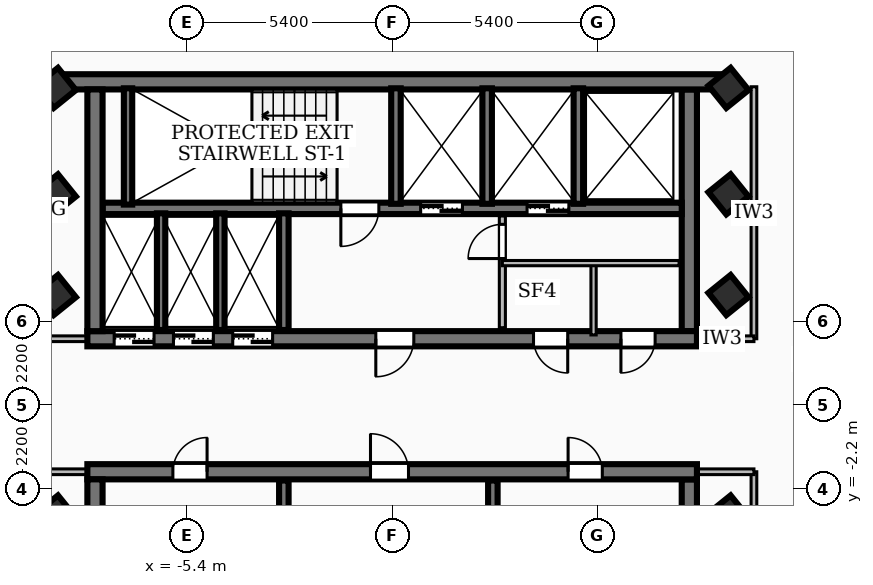
"""IFC4 building model, lengths in metres.
Left out: names, types, materials, properties, quantities, classifications, styles, units other than length and angle.
Written with IfcOpenShell. Run it as: python <this file> out.ifc"""

import sys

from ifc_helpers import new_model, si_unit, direction, frame, frame_2d, origin, origin_2d, place, context, subcontext, project, spatial, rectangle, extrude, element, fill, save


model = new_model("IFC4")
c1 = context("Model", 3, precision=1e-05, world=origin(), true_north=direction((0.0, 1.0)))
c2 = subcontext(c1, "Body", "Model", "MODEL_VIEW")
j1 = project(units=[si_unit("LENGTHUNIT", "METRE"), si_unit("PLANEANGLEUNIT", "RADIAN")], contexts=[c1])
p1 = place(None, origin())
s1 = spatial("IfcSite", under=j1, at=p1, CompositionType="ELEMENT")
p2 = place(p1, origin())
s2 = spatial("IfcBuilding", under=s1, at=p2, CompositionType="ELEMENT")
p3 = place(p2, frame((0.0, 0.0, 235.98)))
s3 = spatial("IfcBuildingStorey", under=s2, at=p3, CompositionType="ELEMENT", Elevation=235.98)
p4 = place(p3, frame((-8.78, 8.51, 0.0), z_axis=(0.0, 0.0, 1.0), x_axis=(1.0, 0.0, 0.0)))
e1 = element("IfcWall", 1, at=p4, inside=s3, PredefinedType="SHEAR", context=c2, shape_type="SweptSolid", body=[
    extrude(rectangle(XDim=17.56, YDim=0.4, at=frame_2d((8.78, 0.0))), origin(), (0.0, 0.0, 1.0), 3.02),
])
p5 = place(p3, frame((8.02, 1.75, 0.0), z_axis=(0.0, 0.0, 1.0), x_axis=(-1.0, 0.0, 0.0)))
e2 = element("IfcWall", 2, at=p5, inside=s3, PredefinedType="SHEAR", context=c2, shape_type="SweptSolid", body=[
    extrude(rectangle(XDim=16.04, YDim=0.4, at=frame_2d((8.02, 0.0))), origin(), (0.0, 0.0, 1.0), 3.02),
])
p6 = place(p5, frame((7.45, 0.0, 0.0)))
e3 = element("IfcOpeningElement", 3, at=p6, cuts=e2, PredefinedType="OPENING", context=c2, shape_type="SweptSolid", body=[
    extrude(rectangle(XDim=1.0, YDim=2.1, at=frame_2d((0.5, 1.05))), frame((0.0, 0.21, 0.0), z_axis=(0.0, -1.0, 0.0), x_axis=(1.0, 0.0, 0.0)), (0.0, 0.0, 1.0), 0.42),
])
p7 = place(p5, frame((14.285, 0.0, 0.0)))
e4 = element("IfcOpeningElement", 4, at=p7, cuts=e2, PredefinedType="OPENING", context=c2, shape_type="SweptSolid", body=[
    extrude(rectangle(XDim=1.05, YDim=2.15, at=frame_2d((0.525, 1.075))), frame((0.0, 0.21, 0.0), z_axis=(0.0, -1.0, 0.0), x_axis=(1.0, 0.0, 0.0)), (0.0, 0.0, 1.0), 0.42),
])
p8 = place(p5, frame((12.725, 0.0, 0.0)))
e5 = element("IfcOpeningElement", 5, at=p8, cuts=e2, PredefinedType="OPENING", context=c2, shape_type="SweptSolid", body=[
    extrude(rectangle(XDim=1.05, YDim=2.15, at=frame_2d((0.525, 1.075))), frame((0.0, 0.21, 0.0), z_axis=(0.0, -1.0, 0.0), x_axis=(1.0, 0.0, 0.0)), (0.0, 0.0, 1.0), 0.42),
])
p9 = place(p5, frame((11.165, 0.0, 0.0)))
e6 = element("IfcOpeningElement", 6, at=p9, cuts=e2, PredefinedType="OPENING", context=c2, shape_type="SweptSolid", body=[
    extrude(rectangle(XDim=1.05, YDim=2.15, at=frame_2d((0.525, 1.075))), frame((0.0, 0.21, 0.0), z_axis=(0.0, -1.0, 0.0), x_axis=(1.0, 0.0, 0.0)), (0.0, 0.0, 1.0), 0.42),
])
p10 = place(p5, frame((3.4, 0.0, 0.0)))
e7 = element("IfcOpeningElement", 7, at=p10, cuts=e2, PredefinedType="OPENING", context=c2, shape_type="SweptSolid", body=[
    extrude(rectangle(XDim=0.9, YDim=2.06, at=frame_2d((0.45, 1.03))), frame((0.0, 0.21, 0.0), z_axis=(0.0, -1.0, 0.0), x_axis=(1.0, 0.0, 0.0)), (0.0, 0.0, 1.0), 0.42),
])
p11 = place(p5, frame((1.1, 0.0, 0.0)))
e8 = element("IfcOpeningElement", 8, at=p11, cuts=e2, PredefinedType="OPENING", context=c2, shape_type="SweptSolid", body=[
    extrude(rectangle(XDim=0.9, YDim=2.06, at=frame_2d((0.45, 1.03))), frame((0.0, 0.21, 0.0), z_axis=(0.0, -1.0, 0.0), x_axis=(1.0, 0.0, 0.0)), (0.0, 0.0, 1.0), 0.42),
])
for number, where, z_axis, x_axis in (
    (9, (-7.82, 1.95, 0.0), (0.0, 0.0, 1.0), (0.0, 1.0, 0.0)),
    (10, (7.82, 8.31, 0.0), (0.0, 0.0, 1.0), (0.0, -1.0, 0.0)),
):
    element("IfcWall", number, at=place(p3, frame(where, z_axis=z_axis, x_axis=x_axis)), inside=s3, PredefinedType="SHEAR", context=c2, shape_type="SweptSolid", body=[
        extrude(rectangle(XDim=6.36, YDim=0.4, at=frame_2d((3.18, 0.0))), origin(), (0.0, 0.0, 1.0), 3.02),
    ])
p12 = place(p3, frame((7.62, 5.18, 0.0), z_axis=(0.0, 0.0, 1.0), x_axis=(-1.0, 0.0, 0.0)))
e11 = element("IfcWall", 11, at=p12, inside=s3, PredefinedType="SOLIDWALL", context=c2, shape_type="SweptSolid", body=[
    extrude(rectangle(XDim=15.24, YDim=0.3, at=frame_2d((7.62, 0.0))), origin(), (0.0, 0.0, 1.0), 3.02),
])
p13 = place(p12, frame((5.77, 0.0, 0.0)))
e12 = element("IfcOpeningElement", 12, at=p13, cuts=e11, PredefinedType="OPENING", context=c2, shape_type="SweptSolid", body=[
    extrude(rectangle(XDim=1.1, YDim=2.15, at=frame_2d((0.55, 1.075))), frame((0.0, 0.16, 0.0), z_axis=(0.0, -1.0, 0.0), x_axis=(1.0, 0.0, 0.0)), (0.0, 0.0, 1.0), 0.32),
])
p14 = place(p12, frame((2.97, 0.0, 0.0)))
e13 = element("IfcOpeningElement", 13, at=p14, cuts=e11, PredefinedType="OPENING", context=c2, shape_type="SweptSolid", body=[
    extrude(rectangle(XDim=1.1, YDim=2.15, at=frame_2d((0.55, 1.075))), frame((0.0, 0.16, 0.0), z_axis=(0.0, -1.0, 0.0), x_axis=(1.0, 0.0, 0.0)), (0.0, 0.0, 1.0), 0.32),
])
p15 = place(p12, frame((7.97, 0.0, 0.0)))
e14 = element("IfcOpeningElement", 14, at=p15, cuts=e11, PredefinedType="OPENING", context=c2, shape_type="SweptSolid", body=[
    extrude(rectangle(XDim=1.0, YDim=2.1, at=frame_2d((0.5, 1.05))), frame((0.0, 0.16, 0.0), z_axis=(0.0, -1.0, 0.0), x_axis=(1.0, 0.0, 0.0)), (0.0, 0.0, 1.0), 0.32),
])
p16 = place(p3, frame((-8.02, -1.75, 0.0), z_axis=(0.0, 0.0, 1.0), x_axis=(1.0, 0.0, 0.0)))
e15 = element("IfcWall", 15, at=p16, inside=s3, PredefinedType="SHEAR", context=c2, shape_type="SweptSolid", body=[
    extrude(rectangle(XDim=16.04, YDim=0.4, at=frame_2d((8.02, 0.0))), origin(), (0.0, 0.0, 1.0), 3.02),
])
p17 = place(p16, frame((7.45, 0.0, 0.0)))
e16 = element("IfcOpeningElement", 16, at=p17, cuts=e15, PredefinedType="OPENING", context=c2, shape_type="SweptSolid", body=[
    extrude(rectangle(XDim=1.0, YDim=2.1, at=frame_2d((0.5, 1.05))), frame((0.0, 0.21, 0.0), z_axis=(0.0, -1.0, 0.0), x_axis=(1.0, 0.0, 0.0)), (0.0, 0.0, 1.0), 0.42),
])
p18 = place(p16, frame((12.65, 0.0, 0.0)))
e17 = element("IfcOpeningElement", 17, at=p18, cuts=e15, PredefinedType="OPENING", context=c2, shape_type="SweptSolid", body=[
    extrude(rectangle(XDim=0.9, YDim=2.06, at=frame_2d((0.45, 1.03))), frame((0.0, 0.21, 0.0), z_axis=(0.0, -1.0, 0.0), x_axis=(1.0, 0.0, 0.0)), (0.0, 0.0, 1.0), 0.42),
])
p19 = place(p16, frame((2.25, 0.0, 0.0)))
e18 = element("IfcOpeningElement", 18, at=p19, cuts=e15, PredefinedType="OPENING", context=c2, shape_type="SweptSolid", body=[
    extrude(rectangle(XDim=0.9, YDim=2.06, at=frame_2d((0.45, 1.03))), frame((0.0, 0.21, 0.0), z_axis=(0.0, -1.0, 0.0), x_axis=(1.0, 0.0, 0.0)), (0.0, 0.0, 1.0), 0.42),
])
for number, where, z_axis, x_axis in (
    (19, (-7.82, -8.31, 0.0), (0.0, 0.0, 1.0), (0.0, 1.0, 0.0)),
    (20, (7.82, -1.95, 0.0), (0.0, 0.0, 1.0), (0.0, -1.0, 0.0)),
):
    element("IfcWall", number, at=place(p3, frame(where, z_axis=z_axis, x_axis=x_axis)), inside=s3, PredefinedType="SHEAR", context=c2, shape_type="SweptSolid", body=[
        extrude(rectangle(XDim=6.36, YDim=0.4, at=frame_2d((3.18, 0.0))), origin(), (0.0, 0.0, 1.0), 3.02),
    ])
p20 = place(p3, frame((-6.95, 5.28, 0.0), z_axis=(0.0, 0.0, 1.0), x_axis=(0.0, 1.0, 0.0)))
e21 = element("IfcWall", 21, at=p20, inside=s3, PredefinedType="SOLIDWALL", context=c2, shape_type="SweptSolid", body=[
    extrude(rectangle(XDim=3.06, YDim=0.22, at=frame_2d((1.53, 0.0))), origin(), (0.0, 0.0, 1.0), 3.02),
])
for number, where, z_axis, x_axis in (
    (22, (0.1, 5.3, 0.0), (0.0, 0.0, 1.0), (0.0, 1.0, 0.0)),
    (23, (2.5, 5.3, 0.0), (0.0, 0.0, 1.0), (0.0, 1.0, 0.0)),
    (24, (4.9, 5.3, 0.0), (0.0, 0.0, 1.0), (0.0, 1.0, 0.0)),
):
    element("IfcWall", number, at=place(p3, frame(where, z_axis=z_axis, x_axis=x_axis)), inside=s3, PredefinedType="SOLIDWALL", context=c2, shape_type="SweptSolid", body=[
        extrude(rectangle(XDim=3.04, YDim=0.25, at=frame_2d((1.52, 0.0))), origin(), (0.0, 0.0, 1.0), 3.02),
    ])
for number, where, z_axis, x_axis in (
    (25, (-2.85, 1.98, 0.0), (0.0, 0.0, 1.0), (0.0, 1.0, 0.0)),
    (26, (-2.85, -5.05, 0.0), (0.0, 0.0, 1.0), (0.0, 1.0, 0.0)),
    (27, (2.65, -5.05, 0.0), (0.0, 0.0, 1.0), (0.0, 1.0, 0.0)),
):
    element("IfcWall", number, at=place(p3, frame(where, z_axis=z_axis, x_axis=x_axis)), inside=s3, PredefinedType="SOLIDWALL", context=c2, shape_type="SweptSolid", body=[
        extrude(rectangle(XDim=3.07, YDim=0.25, at=frame_2d((1.535, 0.0))), origin(), (0.0, 0.0, 1.0), 3.02),
    ])
for number, where, z_axis, x_axis in (
    (28, (-6.08, 1.98, 0.0), (0.0, 0.0, 1.0), (0.0, 1.0, 0.0)),
    (29, (-4.52, 1.98, 0.0), (0.0, 0.0, 1.0), (0.0, 1.0, 0.0)),
):
    element("IfcWall", number, at=place(p3, frame(where, z_axis=z_axis, x_axis=x_axis)), inside=s3, PredefinedType="SOLIDWALL", context=c2, shape_type="SweptSolid", body=[
        extrude(rectangle(XDim=3.07, YDim=0.22, at=frame_2d((1.535, 0.0))), origin(), (0.0, 0.0, 1.0), 3.02),
    ])
for number, where, z_axis, x_axis in (
    (30, (-8.85, -2.9, 0.0), (0.0, 0.0, 1.0), (0.778, 0.628, 0.0)),
    (31, (-8.85, 2.9, 0.0), (0.0, 0.0, 1.0), (0.778, 0.628, 0.0)),
    (32, (-8.85, 5.55, 0.0), (0.0, 0.0, 1.0), (0.778, 0.628, 0.0)),
    (33, (8.85, -2.9, 0.0), (0.0, 0.0, 1.0), (0.778, 0.628, 0.0)),
    (34, (8.85, 2.9, 0.0), (0.0, 0.0, 1.0), (0.778, 0.628, 0.0)),
    (35, (8.85, 5.55, 0.0), (0.0, 0.0, 1.0), (0.778, 0.628, 0.0)),
    (36, (-8.85, 8.35, 0.0), (0.0, 0.0, 1.0), (0.778, 0.628, 0.0)),
    (37, (8.85, 8.35, 0.0), (0.0, 0.0, 1.0), (0.778, 0.628, 0.0)),
):
    element("IfcColumn", number, at=place(p3, frame(where, z_axis=z_axis, x_axis=x_axis)), inside=s3, PredefinedType="COLUMN", context=c2, shape_type="SweptSolid", body=[
        extrude(rectangle(XDim=0.75, YDim=0.75, at=origin_2d()), origin(), (0.0, 0.0, 1.0), 3.42),
    ])
p21 = place(p3, frame((2.9, 2.04, 0.0), z_axis=(0.0, 0.0, 1.0), x_axis=(0.0, 1.0, 0.0)))
e38 = element("IfcWall", 38, at=p21, inside=s3, PredefinedType="PARTITIONING", context=c2, shape_type="SweptSolid", body=[
    extrude(rectangle(XDim=2.94, YDim=0.16, at=frame_2d((1.47, 0.0))), origin(), (0.0, 0.0, 1.0), 2.25),
])
p22 = place(p21, frame((1.82, 0.0, 0.0)))
e39 = element("IfcOpeningElement", 39, at=p22, cuts=e38, PredefinedType="OPENING", context=c2, shape_type="SweptSolid", body=[
    extrude(rectangle(XDim=0.9, YDim=2.06, at=frame_2d((0.45, 1.03))), frame((0.0, 0.09, 0.0), z_axis=(0.0, -1.0, 0.0), x_axis=(1.0, 0.0, 0.0)), (0.0, 0.0, 1.0), 0.18),
])
p23 = place(p3, frame((2.9, 3.74, 0.0), z_axis=(0.0, 0.0, 1.0), x_axis=(1.0, 0.0, 0.0)))
e40 = element("IfcWall", 40, at=p23, inside=s3, PredefinedType="PARTITIONING", context=c2, shape_type="SweptSolid", body=[
    extrude(rectangle(XDim=4.65, YDim=0.138, at=frame_2d((2.325, 0.0))), origin(), (0.0, 0.0, 1.0), 3.02),
])
p24 = place(p3, frame((5.3, 1.85, 0.0), z_axis=(0.0, 0.0, 1.0), x_axis=(0.0, 1.0, 0.0)))
e41 = element("IfcWall", 41, at=p24, inside=s3, PredefinedType="PARTITIONING", context=c2, shape_type="SweptSolid", body=[
    extrude(rectangle(XDim=1.89, YDim=0.138, at=frame_2d((0.945, 0.0))), origin(), (0.0, 0.0, 1.0), 2.25),
])
for number, where, z_axis, x_axis in (
    (42, (-7.85, 1.75, 0.0), (0.0, 0.0, 1.0), (-1.0, 0.0, 0.0)),
    (43, (-7.85, -1.75, 0.0), (0.0, 0.0, 1.0), (-1.0, 0.0, 0.0)),
):
    element("IfcWall", number, at=place(p3, frame(where, z_axis=z_axis, x_axis=x_axis)), inside=s3, PredefinedType="PARTITIONING", context=c2, shape_type="SweptSolid", body=[
        extrude(rectangle(XDim=1.67, YDim=0.15, at=frame_2d((0.835, 0.0))), origin(), (0.0, 0.0, 1.0), 1.15),
    ])
p25 = place(p3, frame((9.52, 1.75, 0.0), z_axis=(0.0, 0.0, 1.0), x_axis=(0.0, 1.0, 0.0)))
e44 = element("IfcWall", 44, at=p25, inside=s3, PredefinedType="PARTITIONING", context=c2, shape_type="SweptSolid", body=[
    extrude(rectangle(XDim=6.63, YDim=0.15, at=frame_2d((3.315, 0.0))), origin(), (0.0, 0.0, 1.0), 2.39),
])
p26 = place(p3, frame((7.85, 1.75, 0.0), z_axis=(0.0, 0.0, 1.0), x_axis=(1.0, 0.0, 0.0)))
e45 = element("IfcWall", 45, at=p26, inside=s3, PredefinedType="PARTITIONING", context=c2, shape_type="SweptSolid", body=[
    extrude(rectangle(XDim=1.67, YDim=0.15, at=frame_2d((0.835, 0.0))), origin(), (0.0, 0.0, 1.0), 2.25),
])
p27 = place(p3, frame((9.52, -8.38, 0.0), z_axis=(0.0, 0.0, 1.0), x_axis=(0.0, 1.0, 0.0)))
e46 = element("IfcWall", 46, at=p27, inside=s3, PredefinedType="PARTITIONING", context=c2, shape_type="SweptSolid", body=[
    extrude(rectangle(XDim=6.63, YDim=0.15, at=frame_2d((3.315, 0.0))), origin(), (0.0, 0.0, 1.0), 3.02),
])
p28 = place(p3, frame((7.85, -1.75, 0.0), z_axis=(0.0, 0.0, 1.0), x_axis=(1.0, 0.0, 0.0)))
e47 = element("IfcWall", 47, at=p28, inside=s3, PredefinedType="PARTITIONING", context=c2, shape_type="SweptSolid", body=[
    extrude(rectangle(XDim=1.67, YDim=0.15, at=frame_2d((0.835, 0.0))), origin(), (0.0, 0.0, 1.0), 2.25),
])
p29 = place(p3, frame((9.938, 16.03, 0.0), z_axis=(0.0, 0.0, 1.0), x_axis=(0.62792440114, -0.778274338812, 0.0)))
e48 = element("IfcWall", 48, at=p29, inside=s3, PredefinedType="PARTITIONING", context=c2, shape_type="SweptSolid", body=[
    extrude(rectangle(XDim=13.07, YDim=0.145, at=frame_2d((6.535, 0.0))), origin(), (0.0, 0.0, 1.0), 2.39),
])
p30 = place(p29, frame((6.405, 0.0, 0.0)))
e49 = element("IfcOpeningElement", 49, at=p30, cuts=e48, PredefinedType="OPENING", context=c2, shape_type="SweptSolid", body=[
    extrude(rectangle(XDim=0.86, YDim=2.04, at=frame_2d((0.43, 1.02))), frame((0.0, 0.083, 0.0), z_axis=(0.0, -1.0, 0.0), x_axis=(1.0, 0.0, 0.0)), (0.0, 0.0, 1.0), 0.165),
])
p31 = place(p29, frame((5.205, 0.0, 0.0)))
e50 = element("IfcOpeningElement", 50, at=p31, cuts=e48, PredefinedType="OPENING", context=c2, shape_type="SweptSolid", body=[
    extrude(rectangle(XDim=0.86, YDim=2.04, at=frame_2d((0.43, 1.02))), frame((0.0, 0.083, 0.0), z_axis=(0.0, -1.0, 0.0), x_axis=(1.0, 0.0, 0.0)), (0.0, 0.0, 1.0), 0.165),
])
p32 = place(p3, frame((-17.239, 4.452, 0.0), z_axis=(0.0, 0.0, 1.0), x_axis=(0.778262183237, 0.627939466942, 0.0)))
e51 = element("IfcWall", 51, at=p32, inside=s3, PredefinedType="PARTITIONING", context=c2, shape_type="SweptSolid", body=[
    extrude(rectangle(XDim=20.641, YDim=0.145, at=frame_2d((10.32, 0.0))), origin(), (0.0, 0.0, 1.0), 2.39),
])
p33 = place(p32, frame((10.02, 0.0, 0.0)))
e52 = element("IfcOpeningElement", 52, at=p33, cuts=e51, PredefinedType="OPENING", context=c2, shape_type="SweptSolid", body=[
    extrude(rectangle(XDim=1.2, YDim=2.1, at=frame_2d((0.6, 1.05))), frame((0.0, 0.083, 0.0), z_axis=(0.0, -1.0, 0.0), x_axis=(1.0, 0.0, 0.0)), (0.0, 0.0, 1.0), 0.165),
])
p34 = place(p3, frame((-4.69, 16.697, 0.0), z_axis=(0.0, 0.0, 1.0), x_axis=(-0.778274338812, -0.62792440114, 0.0)))
e53 = element("IfcWall", 53, at=p34, inside=s3, PredefinedType="PARTITIONING", context=c2, shape_type="SweptSolid", body=[
    extrude(rectangle(XDim=13.07, YDim=0.145, at=frame_2d((6.535, 0.0))), origin(), (0.0, 0.0, 1.0), 3.02),
])
p35 = place(p34, frame((6.385, 0.0, 0.0)))
e54 = element("IfcOpeningElement", 54, at=p35, cuts=e53, PredefinedType="OPENING", context=c2, shape_type="SweptSolid", body=[
    extrude(rectangle(XDim=0.86, YDim=2.04, at=frame_2d((0.43, 1.02))), frame((0.0, 0.083, 0.0), z_axis=(0.0, -1.0, 0.0), x_axis=(1.0, 0.0, 0.0)), (0.0, 0.0, 1.0), 0.165),
])
p36 = place(p34, frame((7.825, 0.0, 0.0)))
e55 = element("IfcOpeningElement", 55, at=p36, cuts=e53, PredefinedType="OPENING", context=c2, shape_type="SweptSolid", body=[
    extrude(rectangle(XDim=0.86, YDim=2.04, at=frame_2d((0.43, 1.02))), frame((0.0, 0.083, 0.0), z_axis=(0.0, -1.0, 0.0), x_axis=(1.0, 0.0, 0.0)), (0.0, 0.0, 1.0), 0.165),
])
p37 = place(p6, origin())
e56 = element("IfcDoor", 56, at=p37, inside=s3, OperationType="SINGLE_SWING_RIGHT", PredefinedType="DOOR", context=c2, shape_type="SweptSolid", body=[
    extrude(rectangle(XDim=1.0, YDim=2.1, at=frame_2d((0.5, 1.05))), frame((0.0, 0.025, 0.0), z_axis=(0.0, -1.0, 0.0), x_axis=(1.0, 0.0, 0.0)), (0.0, 0.0, 1.0), 0.05),
])
fill(e3, e56)
p38 = place(p17, origin())
e57 = element("IfcDoor", 57, at=p38, inside=s3, OperationType="SINGLE_SWING_LEFT", PredefinedType="DOOR", context=c2, shape_type="SweptSolid", body=[
    extrude(rectangle(XDim=1.0, YDim=2.1, at=frame_2d((0.5, 1.05))), frame((0.0, 0.025, 0.0), z_axis=(0.0, -1.0, 0.0), x_axis=(1.0, 0.0, 0.0)), (0.0, 0.0, 1.0), 0.05),
])
fill(e16, e57)
p39 = place(p13, origin())
e58 = element("IfcDoor", 58, at=p39, inside=s3, OperationType="DOUBLE_DOOR_SLIDING", PredefinedType="DOOR", context=c2, shape_type="SweptSolid", body=[
    extrude(rectangle(XDim=1.1, YDim=2.15, at=frame_2d((0.55, 1.075))), frame((0.0, 0.025, 0.0), z_axis=(0.0, -1.0, 0.0), x_axis=(1.0, 0.0, 0.0)), (0.0, 0.0, 1.0), 0.05),
])
fill(e12, e58)
p40 = place(p14, origin())
e59 = element("IfcDoor", 59, at=p40, inside=s3, OperationType="DOUBLE_DOOR_SLIDING", PredefinedType="DOOR", context=c2, shape_type="SweptSolid", body=[
    extrude(rectangle(XDim=1.1, YDim=2.15, at=frame_2d((0.55, 1.075))), frame((0.0, 0.025, 0.0), z_axis=(0.0, -1.0, 0.0), x_axis=(1.0, 0.0, 0.0)), (0.0, 0.0, 1.0), 0.05),
])
fill(e13, e59)
p41 = place(p15, origin())
e60 = element("IfcDoor", 60, at=p41, inside=s3, OperationType="SINGLE_SWING_RIGHT", PredefinedType="DOOR", context=c2, shape_type="SweptSolid", body=[
    extrude(rectangle(XDim=1.0, YDim=2.1, at=frame_2d((0.5, 1.05))), frame((0.0, 0.025, 0.0), z_axis=(0.0, -1.0, 0.0), x_axis=(1.0, 0.0, 0.0)), (0.0, 0.0, 1.0), 0.05),
])
fill(e14, e60)
p42 = place(p7, origin())
e61 = element("IfcDoor", 61, at=p42, inside=s3, OperationType="DOUBLE_DOOR_SLIDING", PredefinedType="DOOR", context=c2, shape_type="SweptSolid", body=[
    extrude(rectangle(XDim=1.05, YDim=2.15, at=frame_2d((0.525, 1.075))), frame((0.0, 0.025, 0.0), z_axis=(0.0, -1.0, 0.0), x_axis=(1.0, 0.0, 0.0)), (0.0, 0.0, 1.0), 0.05),
])
fill(e4, e61)
p43 = place(p8, origin())
e62 = element("IfcDoor", 62, at=p43, inside=s3, OperationType="DOUBLE_DOOR_SLIDING", PredefinedType="DOOR", context=c2, shape_type="SweptSolid", body=[
    extrude(rectangle(XDim=1.05, YDim=2.15, at=frame_2d((0.525, 1.075))), frame((0.0, 0.025, 0.0), z_axis=(0.0, -1.0, 0.0), x_axis=(1.0, 0.0, 0.0)), (0.0, 0.0, 1.0), 0.05),
])
fill(e5, e62)
p44 = place(p9, origin())
e63 = element("IfcDoor", 63, at=p44, inside=s3, OperationType="DOUBLE_DOOR_SLIDING", PredefinedType="DOOR", context=c2, shape_type="SweptSolid", body=[
    extrude(rectangle(XDim=1.05, YDim=2.15, at=frame_2d((0.525, 1.075))), frame((0.0, 0.025, 0.0), z_axis=(0.0, -1.0, 0.0), x_axis=(1.0, 0.0, 0.0)), (0.0, 0.0, 1.0), 0.05),
])
fill(e6, e63)
p45 = place(p18, origin())
e64 = element("IfcDoor", 64, at=p45, inside=s3, OperationType="SINGLE_SWING_LEFT", PredefinedType="DOOR", context=c2, shape_type="SweptSolid", body=[
    extrude(rectangle(XDim=0.9, YDim=2.06, at=frame_2d((0.45, 1.03))), frame((0.0, 0.025, 0.0), z_axis=(0.0, -1.0, 0.0), x_axis=(1.0, 0.0, 0.0)), (0.0, 0.0, 1.0), 0.05),
])
fill(e17, e64)
p46 = place(p19, origin())
e65 = element("IfcDoor", 65, at=p46, inside=s3, OperationType="SINGLE_SWING_RIGHT", PredefinedType="DOOR", context=c2, shape_type="SweptSolid", body=[
    extrude(rectangle(XDim=0.9, YDim=2.06, at=frame_2d((0.45, 1.03))), frame((0.0, 0.025, 0.0), z_axis=(0.0, -1.0, 0.0), x_axis=(1.0, 0.0, 0.0)), (0.0, 0.0, 1.0), 0.05),
])
fill(e18, e65)
p47 = place(p10, origin())
e66 = element("IfcDoor", 66, at=p47, inside=s3, OperationType="SINGLE_SWING_LEFT", PredefinedType="DOOR", context=c2, shape_type="SweptSolid", body=[
    extrude(rectangle(XDim=0.9, YDim=2.06, at=frame_2d((0.45, 1.03))), frame((0.0, 0.025, 0.0), z_axis=(0.0, -1.0, 0.0), x_axis=(1.0, 0.0, 0.0)), (0.0, 0.0, 1.0), 0.05),
])
fill(e7, e66)
p48 = place(p11, origin())
e67 = element("IfcDoor", 67, at=p48, inside=s3, OperationType="SINGLE_SWING_RIGHT", PredefinedType="DOOR", context=c2, shape_type="SweptSolid", body=[
    extrude(rectangle(XDim=0.9, YDim=2.06, at=frame_2d((0.45, 1.03))), frame((0.0, 0.025, 0.0), z_axis=(0.0, -1.0, 0.0), x_axis=(1.0, 0.0, 0.0)), (0.0, 0.0, 1.0), 0.05),
])
fill(e8, e67)
p49 = place(p22, origin())
e68 = element("IfcDoor", 68, at=p49, inside=s3, OperationType="SINGLE_SWING_LEFT", PredefinedType="DOOR", context=c2, shape_type="SweptSolid", body=[
    extrude(rectangle(XDim=0.9, YDim=2.06, at=frame_2d((0.45, 1.03))), frame((0.0, 0.025, 0.0), z_axis=(0.0, -1.0, 0.0), x_axis=(1.0, 0.0, 0.0)), (0.0, 0.0, 1.0), 0.05),
])
fill(e39, e68)
save(model, sys.argv[1])
